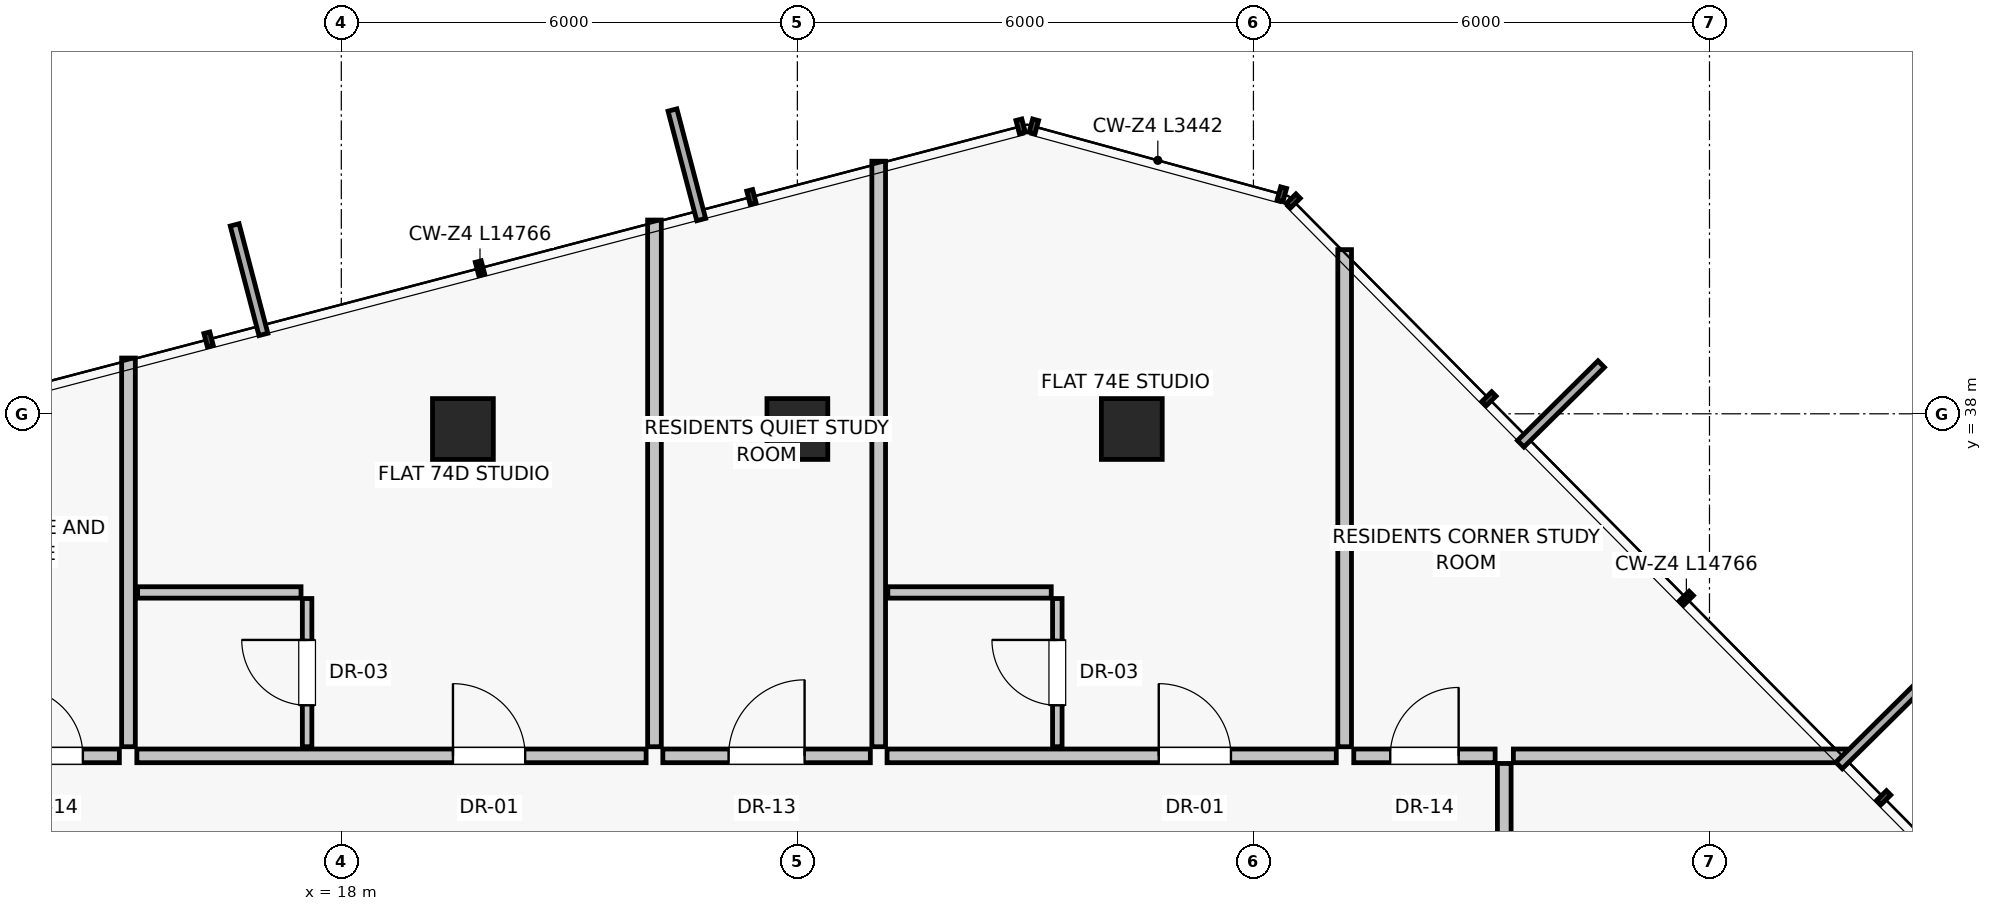
"""IFC4 building model, lengths in metres.
Left out: names, types, materials, properties, quantities, classifications, styles, units other than length and angle.
Written with IfcOpenShell. Run it as: python <this file> out.ifc"""

import sys

from ifc_helpers import new_model, si_unit, direction, frame, frame_2d, origin, origin_2d, place, context, subcontext, project, spatial, rectangle, extrude, source, transform, mapped, element, fill, save


model = new_model("IFC4")
c1 = context("Model", 3, precision=1e-05, world=origin(), true_north=direction((0.0, 1.0)))
c2 = subcontext(c1, "Body", "Model", "MODEL_VIEW")
j1 = project(units=[si_unit("LENGTHUNIT", "METRE"), si_unit("PLANEANGLEUNIT", "RADIAN")], contexts=[c1])
p1 = place(None, origin())
s1 = spatial("IfcSite", under=j1, at=p1, CompositionType="ELEMENT")
p2 = place(p1, origin())
s2 = spatial("IfcBuilding", under=s1, at=p2, CompositionType="ELEMENT")
p3 = place(p2, frame((0.0, 0.0, 261.0)))
s3 = spatial("IfcBuildingStorey", under=s2, at=p3, CompositionType="ELEMENT", Elevation=261.0)
for number, where, z_axis, x_axis in (
    (1, (28.4, 37.8, 0.0), (0.0, 0.0, 1.0), (1.0, 0.0, 0.0)),
    (2, (24.0, 37.8, 0.0), (0.0, 0.0, 1.0), (1.0, 0.0, 0.0)),
    (3, (19.6, 37.8, 0.0), (0.0, 0.0, 1.0), (1.0, 0.0, 0.0)),
):
    element("IfcColumn", number, at=place(p3, frame(where, z_axis=z_axis, x_axis=x_axis)), inside=s3, PredefinedType="COLUMN", context=c2, shape_type="SweptSolid", body=[
        extrude(rectangle(XDim=0.8, YDim=0.8, at=origin_2d()), origin(), (0.0, 0.0, 1.0), 3.25),
    ])
p4 = place(p3, frame((15.2, 33.62, 0.0), z_axis=(0.0, 0.0, 1.0), x_axis=(0.0, 1.0, 0.0)))
e4 = element("IfcWall", 4, at=p4, inside=s3, PredefinedType="PARTITIONING", context=c2, shape_type="SweptSolid", body=[
    extrude(rectangle(XDim=5.114, YDim=0.18, at=frame_2d((2.557, 0.0))), origin(), (0.0, 0.0, 1.0), 2.93),
])
p5 = place(p3, frame((31.2, 33.62, 0.0), z_axis=(0.0, 0.0, 1.0), x_axis=(0.0, 1.0, 0.0)))
e5 = element("IfcWall", 5, at=p5, inside=s3, PredefinedType="PARTITIONING", context=c2, shape_type="SweptSolid", body=[
    extrude(rectangle(XDim=6.54, YDim=0.18, at=frame_2d((3.27, 0.0))), origin(), (0.0, 0.0, 1.0), 2.93),
])
p6 = place(p3, frame((22.23, 33.5, 0.0), z_axis=(0.0, 0.0, 1.0), x_axis=(1.0, 0.0, 0.0)))
e6 = element("IfcWall", 6, at=p6, inside=s3, PredefinedType="PARTITIONING", context=c2, shape_type="SweptSolid", body=[
    extrude(rectangle(XDim=2.73, YDim=0.18, at=frame_2d((1.365, 0.0))), origin(), (0.0, 0.0, 1.0), 2.93),
])
p7 = place(p6, frame((0.865, 0.0, 0.0)))
e7 = element("IfcOpeningElement", 7, at=p7, cuts=e6, PredefinedType="OPENING", context=c2, shape_type="SweptSolid", body=[
    extrude(rectangle(XDim=1.0, YDim=2.01, at=frame_2d((0.5, 1.005))), frame((0.0, 0.1, 0.0), z_axis=(0.0, -1.0, 0.0), x_axis=(1.0, 0.0, 0.0)), (0.0, 0.0, 1.0), 0.2),
])
p8 = place(p3, frame((22.12, 33.62, 0.0), z_axis=(0.0, 0.0, 1.0), x_axis=(0.0, 1.0, 0.0)))
e8 = element("IfcWall", 8, at=p8, inside=s3, PredefinedType="PARTITIONING", context=c2, shape_type="SweptSolid", body=[
    extrude(rectangle(XDim=6.929, YDim=0.18, at=frame_2d((3.464, 0.0))), origin(), (0.0, 0.0, 1.0), 2.93),
])
p9 = place(p3, frame((15.31, 33.5, 0.0), z_axis=(0.0, 0.0, 1.0), x_axis=(1.0, 0.0, 0.0)))
e9 = element("IfcWall", 9, at=p9, inside=s3, PredefinedType="PARTITIONING", context=c2, shape_type="SweptSolid", body=[
    extrude(rectangle(XDim=6.7, YDim=0.18, at=frame_2d((3.35, 0.0))), origin(), (0.0, 0.0, 1.0), 2.93),
])
p10 = place(p9, frame((4.159, 0.0, 0.0)))
e10 = element("IfcOpeningElement", 10, at=p10, cuts=e9, PredefinedType="OPENING", context=c2, shape_type="SweptSolid", body=[
    extrude(rectangle(XDim=0.95, YDim=2.02, at=frame_2d((0.475, 1.01))), frame((0.0, 0.1, 0.0), z_axis=(0.0, -1.0, 0.0), x_axis=(1.0, 0.0, 0.0)), (0.0, 0.0, 1.0), 0.2),
])
p11 = place(p3, frame((17.55, 33.62, 0.0), z_axis=(0.0, 0.0, 1.0), x_axis=(0.0, 1.0, 0.0)))
e11 = element("IfcWall", 11, at=p11, inside=s3, PredefinedType="PARTITIONING", context=c2, shape_type="SweptSolid", body=[
    extrude(rectangle(XDim=1.95, YDim=0.125, at=frame_2d((0.975, 0.0))), origin(), (0.0, 0.0, 1.0), 2.93),
])
p12 = place(p11, frame((0.545, 0.0, 0.0)))
e12 = element("IfcOpeningElement", 12, at=p12, cuts=e11, PredefinedType="OPENING", context=c2, shape_type="SweptSolid", body=[
    extrude(rectangle(XDim=0.86, YDim=2.01, at=frame_2d((0.43, 1.005))), frame((0.0, 0.073, 0.0), z_axis=(0.0, -1.0, 0.0), x_axis=(1.0, 0.0, 0.0)), (0.0, 0.0, 1.0), 0.145),
])
p13 = place(p3, frame((15.32, 35.65, 0.0), z_axis=(0.0, 0.0, 1.0), x_axis=(1.0, 0.0, 0.0)))
e13 = element("IfcWall", 13, at=p13, inside=s3, PredefinedType="PARTITIONING", context=c2, shape_type="SweptSolid", body=[
    extrude(rectangle(XDim=2.15, YDim=0.15, at=frame_2d((1.075, 0.0))), origin(), (0.0, 0.0, 1.0), 2.93),
])
p14 = place(p3, frame((25.07, 33.62, 0.0), z_axis=(0.0, 0.0, 1.0), x_axis=(0.0, 1.0, 0.0)))
e14 = element("IfcWall", 14, at=p14, inside=s3, PredefinedType="PARTITIONING", context=c2, shape_type="SweptSolid", body=[
    extrude(rectangle(XDim=7.703, YDim=0.18, at=frame_2d((3.852, 0.0))), origin(), (0.0, 0.0, 1.0), 2.93),
])
p15 = place(p3, frame((25.18, 33.5, 0.0), z_axis=(0.0, 0.0, 1.0), x_axis=(1.0, 0.0, 0.0)))
e15 = element("IfcWall", 15, at=p15, inside=s3, PredefinedType="PARTITIONING", context=c2, shape_type="SweptSolid", body=[
    extrude(rectangle(XDim=5.91, YDim=0.18, at=frame_2d((2.955, 0.0))), origin(), (0.0, 0.0, 1.0), 2.93),
])
p16 = place(p15, frame((3.574, 0.0, 0.0)))
e16 = element("IfcOpeningElement", 16, at=p16, cuts=e15, PredefinedType="OPENING", context=c2, shape_type="SweptSolid", body=[
    extrude(rectangle(XDim=0.95, YDim=2.02, at=frame_2d((0.475, 1.01))), frame((0.0, 0.1, 0.0), z_axis=(0.0, -1.0, 0.0), x_axis=(1.0, 0.0, 0.0)), (0.0, 0.0, 1.0), 0.2),
])
p17 = place(p3, frame((27.42, 33.62, 0.0), z_axis=(0.0, 0.0, 1.0), x_axis=(0.0, 1.0, 0.0)))
e17 = element("IfcWall", 17, at=p17, inside=s3, PredefinedType="PARTITIONING", context=c2, shape_type="SweptSolid", body=[
    extrude(rectangle(XDim=1.95, YDim=0.125, at=frame_2d((0.975, 0.0))), origin(), (0.0, 0.0, 1.0), 2.93),
])
p18 = place(p17, frame((0.545, 0.0, 0.0)))
e18 = element("IfcOpeningElement", 18, at=p18, cuts=e17, PredefinedType="OPENING", context=c2, shape_type="SweptSolid", body=[
    extrude(rectangle(XDim=0.86, YDim=2.01, at=frame_2d((0.43, 1.005))), frame((0.0, 0.073, 0.0), z_axis=(0.0, -1.0, 0.0), x_axis=(1.0, 0.0, 0.0)), (0.0, 0.0, 1.0), 0.145),
])
p19 = place(p3, frame((25.19, 35.65, 0.0), z_axis=(0.0, 0.0, 1.0), x_axis=(1.0, 0.0, 0.0)))
e19 = element("IfcWall", 19, at=p19, inside=s3, PredefinedType="PARTITIONING", context=c2, shape_type="SweptSolid", body=[
    extrude(rectangle(XDim=2.15, YDim=0.15, at=frame_2d((1.075, 0.0))), origin(), (0.0, 0.0, 1.0), 2.93),
])
p20 = place(p3, frame((33.3, 31.5, 0.0), z_axis=(0.0, 0.0, 1.0), x_axis=(0.0, 1.0, 0.0)))
e20 = element("IfcWall", 20, at=p20, inside=s3, PredefinedType="PARTITIONING", context=c2, shape_type="SweptSolid", body=[
    extrude(rectangle(XDim=1.9, YDim=0.18, at=frame_2d((0.95, 0.0))), origin(), (0.0, 0.0, 1.0), 2.93),
])
p21 = place(p3, frame((13.22, 33.5, 0.0), z_axis=(0.0, 0.0, 1.0), x_axis=(1.0, 0.0, 0.0)))
e21 = element("IfcWall", 21, at=p21, inside=s3, PredefinedType="PARTITIONING", context=c2, shape_type="SweptSolid", body=[
    extrude(rectangle(XDim=1.86, YDim=0.18, at=frame_2d((0.93, 0.0))), origin(), (0.0, 0.0, 1.0), 2.93),
])
p22 = place(p21, frame((0.48, 0.0, 0.0)))
e22 = element("IfcOpeningElement", 22, at=p22, cuts=e21, PredefinedType="OPENING", context=c2, shape_type="SweptSolid", body=[
    extrude(rectangle(XDim=0.9, YDim=2.01, at=frame_2d((0.45, 1.005))), frame((0.0, 0.1, 0.0), z_axis=(0.0, -1.0, 0.0), x_axis=(1.0, 0.0, 0.0)), (0.0, 0.0, 1.0), 0.2),
])
p23 = place(p3, frame((33.42, 33.5, 0.0), z_axis=(0.0, 0.0, 1.0), x_axis=(1.0, 0.0, 0.0)))
e23 = element("IfcWall", 23, at=p23, inside=s3, PredefinedType="PARTITIONING", context=c2, shape_type="SweptSolid", body=[
    extrude(rectangle(XDim=4.37, YDim=0.18, at=frame_2d((2.185, 0.0))), origin(), (0.0, 0.0, 1.0), 2.93),
])
p24 = place(p3, frame((31.32, 33.5, 0.0), z_axis=(0.0, 0.0, 1.0), x_axis=(1.0, 0.0, 0.0)))
e24 = element("IfcWall", 24, at=p24, inside=s3, PredefinedType="PARTITIONING", context=c2, shape_type="SweptSolid", body=[
    extrude(rectangle(XDim=1.86, YDim=0.18, at=frame_2d((0.93, 0.0))), origin(), (0.0, 0.0, 1.0), 2.93),
])
p25 = place(p24, frame((0.48, 0.0, 0.0)))
e25 = element("IfcOpeningElement", 25, at=p25, cuts=e24, PredefinedType="OPENING", context=c2, shape_type="SweptSolid", body=[
    extrude(rectangle(XDim=0.9, YDim=2.01, at=frame_2d((0.45, 1.005))), frame((0.0, 0.1, 0.0), z_axis=(0.0, -1.0, 0.0), x_axis=(1.0, 0.0, 0.0)), (0.0, 0.0, 1.0), 0.2),
])
m1 = source(origin(), c2, "Body", "SweptSolid", [
    extrude(rectangle(XDim=1.0, YDim=2.01, at=frame_2d((0.5, 1.005))), frame((0.0, 0.025, 0.0), z_axis=(0.0, -1.0, 0.0), x_axis=(1.0, 0.0, 0.0)), (0.0, 0.0, 1.0), 0.05),
])
p26 = place(p7, origin())
e26 = element("IfcDoor", 26, at=p26, inside=s3, OperationType="SINGLE_SWING_RIGHT", PredefinedType="DOOR", context=c2, shape_type="MappedRepresentation", body=[
    mapped(m1, transform((0.0, 0.0, 0.0), scale=1.0)),
])
fill(e7, e26)
m2 = source(origin(), c2, "Body", "SweptSolid", [
    extrude(rectangle(XDim=0.95, YDim=2.02, at=frame_2d((0.475, 1.01))), frame((0.0, 0.025, 0.0), z_axis=(0.0, -1.0, 0.0), x_axis=(1.0, 0.0, 0.0)), (0.0, 0.0, 1.0), 0.05),
])
p27 = place(p10, origin())
e27 = element("IfcDoor", 27, at=p27, inside=s3, OperationType="SINGLE_SWING_LEFT", PredefinedType="DOOR", context=c2, shape_type="MappedRepresentation", body=[
    mapped(m2, transform((0.0, 0.0, 0.0), scale=1.0)),
])
fill(e10, e27)
m3 = source(origin(), c2, "Body", "SweptSolid", [
    extrude(rectangle(XDim=0.86, YDim=2.01, at=frame_2d((0.43, 1.005))), frame((0.0, 0.025, 0.0), z_axis=(0.0, -1.0, 0.0), x_axis=(1.0, 0.0, 0.0)), (0.0, 0.0, 1.0), 0.05),
])
p28 = place(p12, origin())
e28 = element("IfcDoor", 28, at=p28, inside=s3, OperationType="SINGLE_SWING_RIGHT", PredefinedType="DOOR", context=c2, shape_type="MappedRepresentation", body=[
    mapped(m3, transform((0.0, 0.0, 0.0), scale=1.0)),
])
fill(e12, e28)
p29 = place(p16, origin())
e29 = element("IfcDoor", 29, at=p29, inside=s3, OperationType="SINGLE_SWING_LEFT", PredefinedType="DOOR", context=c2, shape_type="MappedRepresentation", body=[
    mapped(m2, transform((0.0, 0.0, 0.0), scale=1.0)),
])
fill(e16, e29)
p30 = place(p18, origin())
e30 = element("IfcDoor", 30, at=p30, inside=s3, OperationType="SINGLE_SWING_RIGHT", PredefinedType="DOOR", context=c2, shape_type="MappedRepresentation", body=[
    mapped(m3, transform((0.0, 0.0, 0.0), scale=1.0)),
])
fill(e18, e30)
m4 = source(origin(), c2, "Body", "SweptSolid", [
    extrude(rectangle(XDim=0.9, YDim=2.01, at=frame_2d((0.45, 1.005))), frame((0.0, 0.025, 0.0), z_axis=(0.0, -1.0, 0.0), x_axis=(1.0, 0.0, 0.0)), (0.0, 0.0, 1.0), 0.05),
])
p31 = place(p22, origin())
e31 = element("IfcDoor", 31, at=p31, inside=s3, OperationType="SINGLE_SWING_LEFT", PredefinedType="DOOR", context=c2, shape_type="MappedRepresentation", body=[
    mapped(m4, transform((0.0, 0.0, 0.0), scale=1.0)),
])
fill(e22, e31)
p32 = place(p25, origin())
e32 = element("IfcDoor", 32, at=p32, inside=s3, OperationType="SINGLE_SWING_RIGHT", PredefinedType="DOOR", context=c2, shape_type="MappedRepresentation", body=[
    mapped(m4, transform((0.0, 0.0, 0.0), scale=1.0)),
])
fill(e25, e32)
save(model, sys.argv[1])
